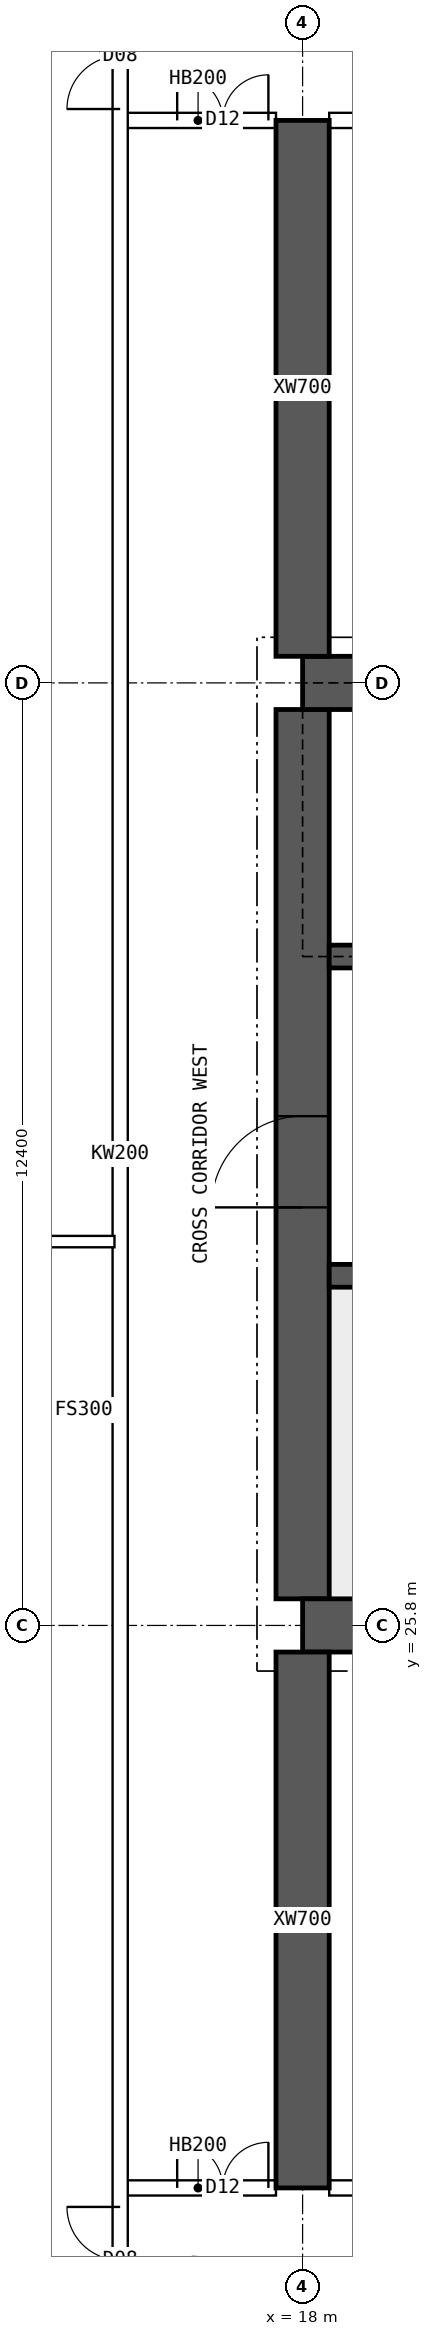
"""IFC4 building model, lengths in metres.
Left out: names, types, materials, properties, quantities, classifications, styles, units other than length and angle.
Written with IfcOpenShell. Run it as: python <this file> out.ifc"""

import sys

from ifc_helpers import new_model, si_unit, direction, frame, frame_2d, origin, place, context, subcontext, project, spatial, polyline, rectangle, outline, extrude, element, fill, save


model = new_model("IFC4")
c1 = context("Model", 3, precision=1e-05, world=origin(), true_north=direction((0.0, 1.0)))
c2 = subcontext(c1, "Body", "Model", "MODEL_VIEW")
j1 = project(units=[si_unit("LENGTHUNIT", "METRE"), si_unit("PLANEANGLEUNIT", "RADIAN")], contexts=[c1])
p1 = place(None, origin())
s1 = spatial("IfcSite", under=j1, at=p1, CompositionType="ELEMENT")
p2 = place(p1, origin())
s2 = spatial("IfcBuilding", under=s1, at=p2, CompositionType="ELEMENT")
p3 = place(p2, frame((0.0, 0.0, 257.8)))
s3 = spatial("IfcBuildingStorey", under=s2, at=p3, CompositionType="ELEMENT", Elevation=257.8)
for number, where, z_axis, x_axis in (
    (1, (18.0, 25.8, 0.0), (0.0, 0.0, 1.0), (1.0, 0.0, 0.0)),
    (2, (18.0, 38.2, 0.0), (0.0, 0.0, 1.0), (1.0, 0.0, 0.0)),
):
    element("IfcWall", number, at=place(p3, frame(where, z_axis=z_axis, x_axis=x_axis)), inside=s3, PredefinedType="SHEAR", context=c2, shape_type="SweptSolid", body=[
        extrude(rectangle(XDim=48.0, YDim=0.7, at=frame_2d((24.0, 0.0))), origin(), (0.0, 0.0, 1.0), 4.5),
    ])
p4 = place(p3, frame((18.0, 26.15, 0.0), z_axis=(0.0, 0.0, 1.0), x_axis=(0.0, 1.0, 0.0)))
e3 = element("IfcWall", 3, at=p4, inside=s3, PredefinedType="SHEAR", context=c2, shape_type="SweptSolid", body=[
    extrude(rectangle(XDim=11.7, YDim=0.7, at=frame_2d((5.85, 0.0))), origin(), (0.0, 0.0, 1.0), 4.5),
])
p5 = place(p4, frame((5.15, 0.0, 0.0)))
e4 = element("IfcOpeningElement", 4, at=p5, cuts=e3, PredefinedType="OPENING", context=c2, shape_type="SweptSolid", body=[
    extrude(rectangle(XDim=1.2, YDim=2.1, at=frame_2d((0.6, 1.05))), frame((0.0, 0.36, 0.0), z_axis=(0.0, -1.0, 0.0), x_axis=(1.0, 0.0, 0.0)), (0.0, 0.0, 1.0), 0.72),
])
p6 = place(p3, frame((18.35, 30.4, 0.0), z_axis=(0.0, 0.0, 1.0), x_axis=(1.0, 0.0, 0.0)))
e5 = element("IfcWall", 5, at=p6, inside=s3, PredefinedType="SHEAR", context=c2, shape_type="SweptSolid", body=[
    extrude(rectangle(XDim=47.3, YDim=0.3, at=frame_2d((23.65, 0.0))), origin(), (0.0, 0.0, 1.0), 4.5),
])
p7 = place(p6, frame((0.4, 0.0, 0.0)))
e6 = element("IfcOpeningElement", 6, at=p7, cuts=e5, PredefinedType="OPENING", context=c2, shape_type="SweptSolid", body=[
    extrude(rectangle(XDim=1.0, YDim=2.1, at=frame_2d((0.5, 1.05))), frame((0.0, 0.16, 0.0), z_axis=(0.0, -1.0, 0.0), x_axis=(1.0, 0.0, 0.0)), (0.0, 0.0, 1.0), 0.32),
])
p8 = place(p6, frame((45.9, 0.0, 0.0)))
e7 = element("IfcOpeningElement", 7, at=p8, cuts=e5, PredefinedType="OPENING", context=c2, shape_type="SweptSolid", body=[
    extrude(rectangle(XDim=1.0, YDim=2.1, at=frame_2d((0.5, 1.05))), frame((0.0, 0.16, 0.0), z_axis=(0.0, -1.0, 0.0), x_axis=(1.0, 0.0, 0.0)), (0.0, 0.0, 1.0), 0.32),
])
p9 = place(p6, frame((8.4, 0.0, 0.0)))
e8 = element("IfcOpeningElement", 8, at=p9, cuts=e5, PredefinedType="OPENING", context=c2, shape_type="SweptSolid", body=[
    extrude(rectangle(XDim=1.1, YDim=2.1, at=frame_2d((0.55, 1.05))), frame((0.0, 0.16, 0.0), z_axis=(0.0, -1.0, 0.0), x_axis=(1.0, 0.0, 0.0)), (0.0, 0.0, 1.0), 0.32),
])
p10 = place(p6, frame((11.0, 0.0, 0.0)))
e9 = element("IfcOpeningElement", 9, at=p10, cuts=e5, PredefinedType="OPENING", context=c2, shape_type="SweptSolid", body=[
    extrude(rectangle(XDim=1.1, YDim=2.1, at=frame_2d((0.55, 1.05))), frame((0.0, 0.16, 0.0), z_axis=(0.0, -1.0, 0.0), x_axis=(1.0, 0.0, 0.0)), (0.0, 0.0, 1.0), 0.32),
])
p11 = place(p6, frame((13.6, 0.0, 0.0)))
e10 = element("IfcOpeningElement", 10, at=p11, cuts=e5, PredefinedType="OPENING", context=c2, shape_type="SweptSolid", body=[
    extrude(rectangle(XDim=1.1, YDim=2.1, at=frame_2d((0.55, 1.05))), frame((0.0, 0.16, 0.0), z_axis=(0.0, -1.0, 0.0), x_axis=(1.0, 0.0, 0.0)), (0.0, 0.0, 1.0), 0.32),
])
p12 = place(p6, frame((16.2, 0.0, 0.0)))
e11 = element("IfcOpeningElement", 11, at=p12, cuts=e5, PredefinedType="OPENING", context=c2, shape_type="SweptSolid", body=[
    extrude(rectangle(XDim=1.1, YDim=2.1, at=frame_2d((0.55, 1.05))), frame((0.0, 0.16, 0.0), z_axis=(0.0, -1.0, 0.0), x_axis=(1.0, 0.0, 0.0)), (0.0, 0.0, 1.0), 0.32),
])
p13 = place(p6, frame((18.975, 0.0, 0.0)))
e12 = element("IfcOpeningElement", 12, at=p13, cuts=e5, PredefinedType="OPENING", context=c2, shape_type="SweptSolid", body=[
    extrude(rectangle(XDim=0.9, YDim=2.1, at=frame_2d((0.45, 1.05))), frame((0.0, 0.16, 0.0), z_axis=(0.0, -1.0, 0.0), x_axis=(1.0, 0.0, 0.0)), (0.0, 0.0, 1.0), 0.32),
])
p14 = place(p6, frame((24.475, 0.0, 0.0)))
e13 = element("IfcOpeningElement", 13, at=p14, cuts=e5, PredefinedType="OPENING", context=c2, shape_type="SweptSolid", body=[
    extrude(rectangle(XDim=0.9, YDim=2.1, at=frame_2d((0.45, 1.05))), frame((0.0, 0.16, 0.0), z_axis=(0.0, -1.0, 0.0), x_axis=(1.0, 0.0, 0.0)), (0.0, 0.0, 1.0), 0.32),
])
p15 = place(p6, frame((30.267, 0.0, 0.0)))
e14 = element("IfcOpeningElement", 14, at=p15, cuts=e5, PredefinedType="OPENING", context=c2, shape_type="SweptSolid", body=[
    extrude(rectangle(XDim=1.1, YDim=2.1, at=frame_2d((0.55, 1.05))), frame((0.0, 0.16, 0.0), z_axis=(0.0, -1.0, 0.0), x_axis=(1.0, 0.0, 0.0)), (0.0, 0.0, 1.0), 0.32),
])
p16 = place(p6, frame((33.8, 0.0, 0.0)))
e15 = element("IfcOpeningElement", 15, at=p16, cuts=e5, PredefinedType="OPENING", context=c2, shape_type="SweptSolid", body=[
    extrude(rectangle(XDim=1.1, YDim=2.1, at=frame_2d((0.55, 1.05))), frame((0.0, 0.16, 0.0), z_axis=(0.0, -1.0, 0.0), x_axis=(1.0, 0.0, 0.0)), (0.0, 0.0, 1.0), 0.32),
])
p17 = place(p6, frame((37.333, 0.0, 0.0)))
e16 = element("IfcOpeningElement", 16, at=p17, cuts=e5, PredefinedType="OPENING", context=c2, shape_type="SweptSolid", body=[
    extrude(rectangle(XDim=1.1, YDim=2.1, at=frame_2d((0.55, 1.05))), frame((0.0, 0.16, 0.0), z_axis=(0.0, -1.0, 0.0), x_axis=(1.0, 0.0, 0.0)), (0.0, 0.0, 1.0), 0.32),
])
p18 = place(p3, frame((18.35, 34.6, 0.0), z_axis=(0.0, 0.0, 1.0), x_axis=(1.0, 0.0, 0.0)))
e17 = element("IfcWall", 17, at=p18, inside=s3, PredefinedType="SHEAR", context=c2, shape_type="SweptSolid", body=[
    extrude(rectangle(XDim=47.3, YDim=0.3, at=frame_2d((23.65, 0.0))), origin(), (0.0, 0.0, 1.0), 4.5),
])
p19 = place(p18, frame((0.9, 0.0, 0.0)))
e18 = element("IfcOpeningElement", 18, at=p19, cuts=e17, PredefinedType="OPENING", context=c2, shape_type="SweptSolid", body=[
    extrude(rectangle(XDim=1.1, YDim=2.1, at=frame_2d((0.55, 1.05))), frame((0.0, 0.16, 0.0), z_axis=(0.0, -1.0, 0.0), x_axis=(1.0, 0.0, 0.0)), (0.0, 0.0, 1.0), 0.32),
])
p20 = place(p18, frame((45.3, 0.0, 0.0)))
e19 = element("IfcOpeningElement", 19, at=p20, cuts=e17, PredefinedType="OPENING", context=c2, shape_type="SweptSolid", body=[
    extrude(rectangle(XDim=1.1, YDim=2.1, at=frame_2d((0.55, 1.05))), frame((0.0, 0.16, 0.0), z_axis=(0.0, -1.0, 0.0), x_axis=(1.0, 0.0, 0.0)), (0.0, 0.0, 1.0), 0.32),
])
p21 = place(p18, frame((4.25, 0.0, 0.0)))
e20 = element("IfcOpeningElement", 20, at=p21, cuts=e17, PredefinedType="OPENING", context=c2, shape_type="SweptSolid", body=[
    extrude(rectangle(XDim=0.9, YDim=2.1, at=frame_2d((0.45, 1.05))), frame((0.0, 0.16, 0.0), z_axis=(0.0, -1.0, 0.0), x_axis=(1.0, 0.0, 0.0)), (0.0, 0.0, 1.0), 0.32),
])
p22 = place(p18, frame((42.15, 0.0, 0.0)))
e21 = element("IfcOpeningElement", 21, at=p22, cuts=e17, PredefinedType="OPENING", context=c2, shape_type="SweptSolid", body=[
    extrude(rectangle(XDim=0.9, YDim=2.1, at=frame_2d((0.45, 1.05))), frame((0.0, 0.16, 0.0), z_axis=(0.0, -1.0, 0.0), x_axis=(1.0, 0.0, 0.0)), (0.0, 0.0, 1.0), 0.32),
])
p23 = place(p18, frame((9.025, 0.0, 0.0)))
e22 = element("IfcOpeningElement", 22, at=p23, cuts=e17, PredefinedType="OPENING", context=c2, shape_type="SweptSolid", body=[
    extrude(rectangle(XDim=0.9, YDim=2.1, at=frame_2d((0.45, 1.05))), frame((0.0, 0.16, 0.0), z_axis=(0.0, -1.0, 0.0), x_axis=(1.0, 0.0, 0.0)), (0.0, 0.0, 1.0), 0.32),
])
p24 = place(p18, frame((12.999, 0.0, 0.0)))
e23 = element("IfcOpeningElement", 23, at=p24, cuts=e17, PredefinedType="OPENING", context=c2, shape_type="SweptSolid", body=[
    extrude(rectangle(XDim=0.9, YDim=2.1, at=frame_2d((0.45, 1.05))), frame((0.0, 0.16, 0.0), z_axis=(0.0, -1.0, 0.0), x_axis=(1.0, 0.0, 0.0)), (0.0, 0.0, 1.0), 0.32),
])
p25 = place(p18, frame((16.646, 0.0, 0.0)))
e24 = element("IfcOpeningElement", 24, at=p25, cuts=e17, PredefinedType="OPENING", context=c2, shape_type="SweptSolid", body=[
    extrude(rectangle(XDim=0.9, YDim=2.1, at=frame_2d((0.45, 1.05))), frame((0.0, 0.16, 0.0), z_axis=(0.0, -1.0, 0.0), x_axis=(1.0, 0.0, 0.0)), (0.0, 0.0, 1.0), 0.32),
])
p26 = place(p18, frame((20.405, 0.0, 0.0)))
e25 = element("IfcOpeningElement", 25, at=p26, cuts=e17, PredefinedType="OPENING", context=c2, shape_type="SweptSolid", body=[
    extrude(rectangle(XDim=0.9, YDim=2.1, at=frame_2d((0.45, 1.05))), frame((0.0, 0.16, 0.0), z_axis=(0.0, -1.0, 0.0), x_axis=(1.0, 0.0, 0.0)), (0.0, 0.0, 1.0), 0.32),
])
p27 = place(p18, frame((24.811, 0.0, 0.0)))
e26 = element("IfcOpeningElement", 26, at=p27, cuts=e17, PredefinedType="OPENING", context=c2, shape_type="SweptSolid", body=[
    extrude(rectangle(XDim=0.9, YDim=2.1, at=frame_2d((0.45, 1.05))), frame((0.0, 0.16, 0.0), z_axis=(0.0, -1.0, 0.0), x_axis=(1.0, 0.0, 0.0)), (0.0, 0.0, 1.0), 0.32),
])
p28 = place(p18, frame((27.608, 0.0, 0.0)))
e27 = element("IfcOpeningElement", 27, at=p28, cuts=e17, PredefinedType="OPENING", context=c2, shape_type="SweptSolid", body=[
    extrude(rectangle(XDim=0.9, YDim=2.1, at=frame_2d((0.45, 1.05))), frame((0.0, 0.16, 0.0), z_axis=(0.0, -1.0, 0.0), x_axis=(1.0, 0.0, 0.0)), (0.0, 0.0, 1.0), 0.32),
])
p29 = place(p18, frame((29.981, 0.0, 0.0)))
e28 = element("IfcOpeningElement", 28, at=p29, cuts=e17, PredefinedType="OPENING", context=c2, shape_type="SweptSolid", body=[
    extrude(rectangle(XDim=0.9, YDim=2.1, at=frame_2d((0.45, 1.05))), frame((0.0, 0.16, 0.0), z_axis=(0.0, -1.0, 0.0), x_axis=(1.0, 0.0, 0.0)), (0.0, 0.0, 1.0), 0.32),
])
p30 = place(p18, frame((33.831, 0.0, 0.0)))
e29 = element("IfcOpeningElement", 29, at=p30, cuts=e17, PredefinedType="OPENING", context=c2, shape_type="SweptSolid", body=[
    extrude(rectangle(XDim=0.9, YDim=2.1, at=frame_2d((0.45, 1.05))), frame((0.0, 0.16, 0.0), z_axis=(0.0, -1.0, 0.0), x_axis=(1.0, 0.0, 0.0)), (0.0, 0.0, 1.0), 0.32),
])
p31 = place(p18, frame((37.579, 0.0, 0.0)))
e30 = element("IfcOpeningElement", 30, at=p31, cuts=e17, PredefinedType="OPENING", context=c2, shape_type="SweptSolid", body=[
    extrude(rectangle(XDim=0.9, YDim=2.1, at=frame_2d((0.45, 1.05))), frame((0.0, 0.16, 0.0), z_axis=(0.0, -1.0, 0.0), x_axis=(1.0, 0.0, 0.0)), (0.0, 0.0, 1.0), 0.32),
])
for number, where, z_axis, x_axis in (
    (31, (18.0, 18.4, 0.0), (0.0, 0.0, 1.0), (0.0, 1.0, 0.0)),
    (32, (18.0, 38.55, 0.0), (0.0, 0.0, 1.0), (0.0, 1.0, 0.0)),
):
    element("IfcWall", number, at=place(p3, frame(where, z_axis=z_axis, x_axis=x_axis)), inside=s3, PredefinedType="SHEAR", context=c2, shape_type="SweptSolid", body=[
        extrude(rectangle(XDim=7.05, YDim=0.7, at=frame_2d((3.525, 0.0))), origin(), (0.0, 0.0, 1.0), 4.5),
    ])
p32 = place(p3, frame((15.6, 18.4, 0.0), z_axis=(0.0, 0.0, 1.0), x_axis=(1.0, 0.0, 0.0)))
e33 = element("IfcWall", 33, at=p32, inside=s3, PredefinedType="SOLIDWALL", context=c2, shape_type="SweptSolid", body=[
    extrude(rectangle(XDim=2.05, YDim=0.2, at=frame_2d((1.025, 0.0))), origin(), (0.0, 0.0, 1.0), 4.2),
])
p33 = place(p32, frame((0.75, 0.0, 0.0)))
e34 = element("IfcOpeningElement", 34, at=p33, cuts=e33, PredefinedType="OPENING", context=c2, shape_type="SweptSolid", body=[
    extrude(rectangle(XDim=1.2, YDim=2.1, at=frame_2d((0.6, 1.05))), frame((0.0, 0.11, 0.0), z_axis=(0.0, -1.0, 0.0), x_axis=(1.0, 0.0, 0.0)), (0.0, 0.0, 1.0), 0.22),
])
p34 = place(p3, frame((18.35, 18.4, 0.0), z_axis=(0.0, 0.0, 1.0), x_axis=(1.0, 0.0, 0.0)))
e35 = element("IfcWall", 35, at=p34, inside=s3, PredefinedType="SOLIDWALL", context=c2, shape_type="SweptSolid", body=[
    extrude(rectangle(XDim=5.3, YDim=0.2, at=frame_2d((2.65, 0.0))), origin(), (0.0, 0.0, 1.0), 4.2),
])
p35 = place(p34, frame((0.8, 0.0, 0.0)))
e36 = element("IfcOpeningElement", 36, at=p35, cuts=e35, PredefinedType="OPENING", context=c2, shape_type="SweptSolid", body=[
    extrude(rectangle(XDim=1.0, YDim=2.1, at=frame_2d((0.5, 1.05))), frame((0.0, 0.11, 0.0), z_axis=(0.0, -1.0, 0.0), x_axis=(1.0, 0.0, 0.0)), (0.0, 0.0, 1.0), 0.22),
])
p36 = place(p3, frame((15.6, 45.6, 0.0), z_axis=(0.0, 0.0, 1.0), x_axis=(1.0, 0.0, 0.0)))
e37 = element("IfcWall", 37, at=p36, inside=s3, PredefinedType="SOLIDWALL", context=c2, shape_type="SweptSolid", body=[
    extrude(rectangle(XDim=2.05, YDim=0.2, at=frame_2d((1.025, 0.0))), origin(), (0.0, 0.0, 1.0), 4.2),
])
p37 = place(p36, frame((0.75, 0.0, 0.0)))
e38 = element("IfcOpeningElement", 38, at=p37, cuts=e37, PredefinedType="OPENING", context=c2, shape_type="SweptSolid", body=[
    extrude(rectangle(XDim=1.2, YDim=2.1, at=frame_2d((0.6, 1.05))), frame((0.0, 0.11, 0.0), z_axis=(0.0, -1.0, 0.0), x_axis=(1.0, 0.0, 0.0)), (0.0, 0.0, 1.0), 0.22),
])
p38 = place(p3, frame((18.35, 45.6, 0.0), z_axis=(0.0, 0.0, 1.0), x_axis=(1.0, 0.0, 0.0)))
e39 = element("IfcWall", 39, at=p38, inside=s3, PredefinedType="SOLIDWALL", context=c2, shape_type="SweptSolid", body=[
    extrude(rectangle(XDim=5.3, YDim=0.2, at=frame_2d((2.65, 0.0))), origin(), (0.0, 0.0, 1.0), 4.2),
])
p39 = place(p38, frame((0.35, 0.0, 0.0)))
e40 = element("IfcOpeningElement", 40, at=p39, cuts=e39, PredefinedType="OPENING", context=c2, shape_type="SweptSolid", body=[
    extrude(rectangle(XDim=0.9, YDim=2.1, at=frame_2d((0.45, 1.05))), frame((0.0, 0.11, 0.0), z_axis=(0.0, -1.0, 0.0), x_axis=(1.0, 0.0, 0.0)), (0.0, 0.0, 1.0), 0.22),
])
p40 = place(p38, frame((3.7, 0.0, 0.0)))
e41 = element("IfcOpeningElement", 41, at=p40, cuts=e39, PredefinedType="OPENING", context=c2, shape_type="SweptSolid", body=[
    extrude(rectangle(XDim=0.9, YDim=2.1, at=frame_2d((0.45, 1.05))), frame((0.0, 0.11, 0.0), z_axis=(0.0, -1.0, 0.0), x_axis=(1.0, 0.0, 0.0)), (0.0, 0.0, 1.0), 0.22),
])
p41 = place(p3, frame((8.705, 30.85, 0.0), z_axis=(0.0, 0.0, 1.0), x_axis=(1.0, 0.0, 0.0)))
e42 = element("IfcWall", 42, at=p41, inside=s3, PredefinedType="PARTITIONING", context=c2, shape_type="SweptSolid", body=[
    extrude(outline(polyline([(0.0, 0.0), (6.82, 0.0), (6.82, 4.2), (3.597, 4.2), (3.595, 3.75), (2.997, 3.75), (2.995, 4.2), (0.0, 4.2), (0.0, 0.0)])), frame((0.0, 0.075, 0.0), z_axis=(0.0, -1.0, 0.0), x_axis=(1.0, 0.0, 0.0)), (0.0, 0.0, 1.0), 0.15),
])
p42 = place(p3, frame((15.6, 11.646, 0.0), z_axis=(0.0, 0.0, 1.0), x_axis=(0.0, 1.0, 0.0)))
e43 = element("IfcWall", 43, at=p42, inside=s3, PredefinedType="SOLIDWALL", context=c2, shape_type="SweptSolid", body=[
    extrude(rectangle(XDim=40.708, YDim=0.2, at=frame_2d((20.354, 0.0))), origin(), (0.0, 0.0, 1.0), 4.2),
])
p43 = place(p42, frame((5.104, 0.0, 0.0)))
e44 = element("IfcOpeningElement", 44, at=p43, cuts=e43, PredefinedType="OPENING", context=c2, shape_type="SweptSolid", body=[
    extrude(rectangle(XDim=1.4, YDim=2.1, at=frame_2d((0.7, 1.05))), frame((0.0, 0.11, 0.0), z_axis=(0.0, -1.0, 0.0), x_axis=(1.0, 0.0, 0.0)), (0.0, 0.0, 1.0), 0.22),
])
p44 = place(p42, frame((34.104, 0.0, 0.0)))
e45 = element("IfcOpeningElement", 45, at=p44, cuts=e43, PredefinedType="OPENING", context=c2, shape_type="SweptSolid", body=[
    extrude(rectangle(XDim=1.4, YDim=2.1, at=frame_2d((0.7, 1.05))), frame((0.0, 0.11, 0.0), z_axis=(0.0, -1.0, 0.0), x_axis=(1.0, 0.0, 0.0)), (0.0, 0.0, 1.0), 0.22),
])
p45 = place(p5, origin())
e46 = element("IfcDoor", 46, at=p45, inside=s3, OperationType="SINGLE_SWING_LEFT", PredefinedType="DOOR", context=c2, shape_type="SweptSolid", body=[
    extrude(rectangle(XDim=1.2, YDim=2.1, at=frame_2d((0.6, 1.05))), frame((0.0, 0.025, 0.0), z_axis=(0.0, -1.0, 0.0), x_axis=(1.0, 0.0, 0.0)), (0.0, 0.0, 1.0), 0.05),
])
fill(e4, e46)
p46 = place(p33, origin())
e47 = element("IfcDoor", 47, at=p46, inside=s3, OperationType="DOUBLE_DOOR_SINGLE_SWING", PredefinedType="DOOR", context=c2, shape_type="SweptSolid", body=[
    extrude(rectangle(XDim=1.2, YDim=2.1, at=frame_2d((0.6, 1.05))), frame((0.0, 0.025, 0.0), z_axis=(0.0, -1.0, 0.0), x_axis=(1.0, 0.0, 0.0)), (0.0, 0.0, 1.0), 0.05),
])
fill(e34, e47)
p47 = place(p37, origin())
e48 = element("IfcDoor", 48, at=p47, inside=s3, OperationType="DOUBLE_DOOR_SINGLE_SWING", PredefinedType="DOOR", context=c2, shape_type="SweptSolid", body=[
    extrude(rectangle(XDim=1.2, YDim=2.1, at=frame_2d((0.6, 1.05))), frame((0.0, 0.025, 0.0), z_axis=(0.0, -1.0, 0.0), x_axis=(1.0, 0.0, 0.0)), (0.0, 0.0, 1.0), 0.05),
])
fill(e38, e48)
p48 = place(p43, origin())
e49 = element("IfcDoor", 49, at=p48, inside=s3, OperationType="DOUBLE_DOOR_SINGLE_SWING", PredefinedType="DOOR", context=c2, shape_type="SweptSolid", body=[
    extrude(rectangle(XDim=1.4, YDim=2.1, at=frame_2d((0.7, 1.05))), frame((0.0, 0.025, 0.0), z_axis=(0.0, -1.0, 0.0), x_axis=(1.0, 0.0, 0.0)), (0.0, 0.0, 1.0), 0.05),
])
fill(e44, e49)
p49 = place(p44, origin())
e50 = element("IfcDoor", 50, at=p49, inside=s3, OperationType="DOUBLE_DOOR_SINGLE_SWING", PredefinedType="DOOR", context=c2, shape_type="SweptSolid", body=[
    extrude(rectangle(XDim=1.4, YDim=2.1, at=frame_2d((0.7, 1.05))), frame((0.0, 0.025, 0.0), z_axis=(0.0, -1.0, 0.0), x_axis=(1.0, 0.0, 0.0)), (0.0, 0.0, 1.0), 0.05),
])
fill(e45, e50)
save(model, sys.argv[1])
